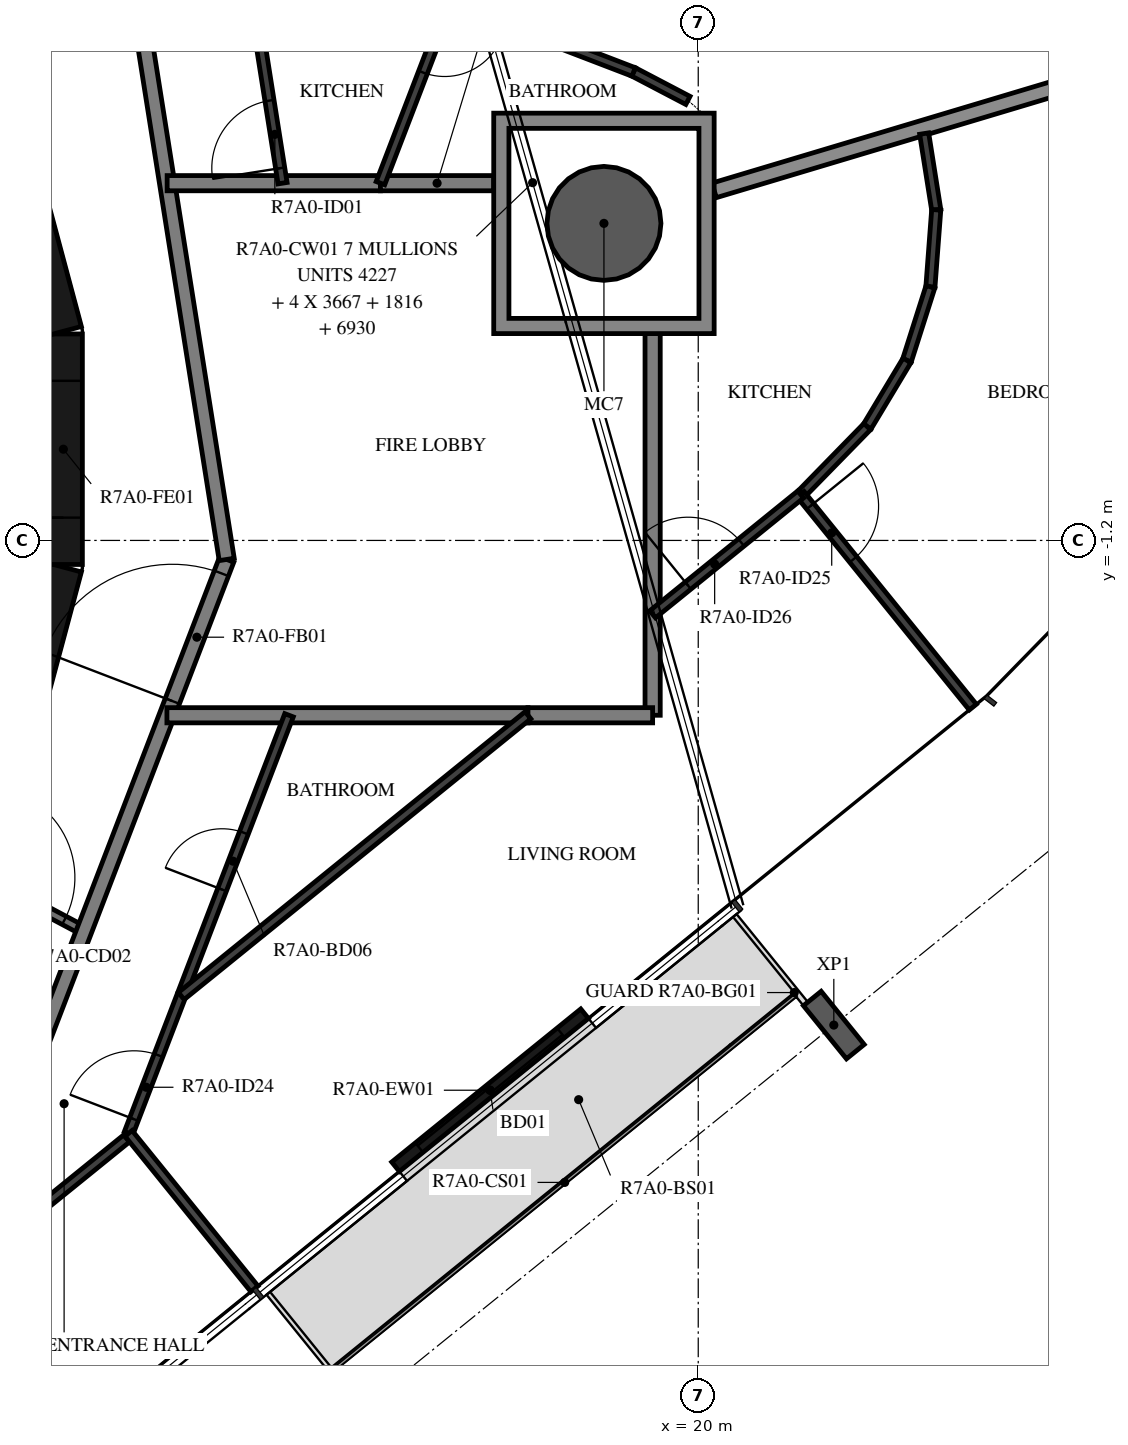
"""IFC4 building model, lengths in metres.
Left out: names, types, materials, properties, quantities, classifications, styles, units other than length and angle.
Written with IfcOpenShell. Run it as: python <this file> out.ifc"""

import sys

from ifc_helpers import new_model, si_unit, direction, frame, frame_2d, origin, origin_2d, place, context, subcontext, project, spatial, polyline, rectangle, hollow_circle, i_section, outline, extrude, element, fill, save


model = new_model("IFC4")
c1 = context("Model", 3, precision=1e-05, world=origin(), true_north=direction((0.0, 1.0)))
c2 = subcontext(c1, "Body", "Model", "MODEL_VIEW")
j1 = project(units=[si_unit("LENGTHUNIT", "METRE"), si_unit("PLANEANGLEUNIT", "RADIAN")], contexts=[c1])
p1 = place(None, origin())
s1 = spatial("IfcSite", under=j1, at=p1, CompositionType="ELEMENT")
p2 = place(p1, origin())
s2 = spatial("IfcBuilding", under=s1, at=p2, CompositionType="ELEMENT")
p3 = place(p2, frame((0.0, 0.0, 270.4)))
s3 = spatial("IfcBuildingStorey", under=s2, at=p3, CompositionType="ELEMENT", Elevation=270.4)
p4 = place(p3, frame((18.76, 2.971, -0.38), z_axis=(0.0, 0.0, 1.0), x_axis=(1.0, 0.0, 0.0)))
e1 = element("IfcColumn", 1, at=p4, inside=s3, PredefinedType="COLUMN", context=c2, shape_type="SweptSolid", body=[
    extrude(hollow_circle(Radius=0.75, WallThickness=0.035, at=origin_2d()), origin(), (0.0, 0.0, 1.0), 3.5),
])
p5 = place(p3, frame((21.784, -7.576, -0.38), z_axis=(0.0, 0.0, 1.0), x_axis=(-0.777146167973, -0.629320136024, 0.0)))
e2 = element("IfcColumn", 2, at=p5, inside=s3, PredefinedType="COLUMN", context=c2, shape_type="SweptSolid", body=[
    extrude(i_section(OverallWidth=0.3, OverallDepth=0.9, WebThickness=0.019, FlangeThickness=0.035, FilletRadius=0.03, at=origin_2d()), origin(), (0.0, 0.0, 1.0), 3.5),
])
p6 = place(p3, frame((16.018, -9.44, 0.0), z_axis=(0.0, 0.0, 1.0), x_axis=(0.777125818, 0.629345265333, 0.0)))
e3 = element("IfcWall", 3, at=p6, inside=s3, PredefinedType="STANDARD", context=c2, shape_type="SweptSolid", body=[
    extrude(rectangle(XDim=3.2, YDim=0.16, at=frame_2d((1.6, 0.0))), origin(), (0.0, 0.0, 1.0), 3.12),
])
p7 = place(p6, frame((0.4, 0.0, 0.0)))
e4 = element("IfcOpeningElement", 4, at=p7, cuts=e3, PredefinedType="OPENING", context=c2, shape_type="SweptSolid", body=[
    extrude(rectangle(XDim=2.4, YDim=2.4, at=frame_2d((1.2, 1.2))), frame((0.0, 0.09, 0.0), z_axis=(0.0, -1.0, 0.0), x_axis=(1.0, 0.0, 0.0)), (0.0, 0.0, 1.0), 0.18),
])
p8 = place(p3, frame((10.858, -4.479, 0.0), z_axis=(0.0, 0.0, 1.0), x_axis=(0.258734743916, 0.965948410781, 0.0)))
e5 = element("IfcWall", 5, at=p8, inside=s3, PredefinedType="SHEAR", context=c2, shape_type="SweptSolid", body=[
    extrude(rectangle(XDim=3.033, YDim=0.5, at=frame_2d((1.516, 0.0))), origin(), (0.0, 0.0, 1.0), 3.12),
])
p9 = place(p3, frame((11.647, -1.516, 0.0), z_axis=(0.0, 0.0, 1.0), x_axis=(0.0, 1.0, 0.0)))
e6 = element("IfcWall", 6, at=p9, inside=s3, PredefinedType="SHEAR", context=c2, shape_type="SweptSolid", body=[
    extrude(rectangle(XDim=3.033, YDim=0.5, at=frame_2d((1.516, 0.0))), origin(), (0.0, 0.0, 1.0), 3.12),
])
p10 = place(p9, frame((0.616, 0.0, 0.0)))
e7 = element("IfcOpeningElement", 7, at=p10, cuts=e6, PredefinedType="OPENING", context=c2, shape_type="SweptSolid", body=[
    extrude(rectangle(XDim=1.8, YDim=2.1, at=frame_2d((0.9, 1.05))), frame((0.0, 0.26, 0.0), z_axis=(0.0, -1.0, 0.0), x_axis=(1.0, 0.0, 0.0)), (0.0, 0.0, 1.0), 0.52),
])
p11 = place(p3, frame((11.643, 1.55, 0.0), z_axis=(0.0, 0.0, 1.0), x_axis=(-0.258734743916, 0.965948410781, 0.0)))
e8 = element("IfcWall", 8, at=p11, inside=s3, PredefinedType="SHEAR", context=c2, shape_type="SweptSolid", body=[
    extrude(rectangle(XDim=3.033, YDim=0.5, at=frame_2d((1.516, 0.0))), origin(), (0.0, 0.0, 1.0), 3.12),
])
p12 = place(p3, frame((10.511, -5.589, 0.0), z_axis=(0.0, 0.0, 1.0), x_axis=(0.882983002821, -0.469404960273, 0.0)))
e9 = element("IfcWall", 9, at=p12, inside=s3, PredefinedType="PARTITIONING", context=c2, shape_type="SweptSolid", body=[
    extrude(rectangle(XDim=1.596, YDim=0.12, at=frame_2d((0.798, 0.0))), origin(), (0.0, 0.0, 1.0), 3.12),
])
p13 = place(p12, frame((0.1, 0.0, 0.0)))
e10 = element("IfcOpeningElement", 10, at=p13, cuts=e9, PredefinedType="OPENING", context=c2, shape_type="SweptSolid", body=[
    extrude(rectangle(XDim=1.2, YDim=2.1, at=frame_2d((0.6, 1.05))), frame((0.0, 0.07, 0.0), z_axis=(0.0, -1.0, 0.0), x_axis=(1.0, 0.0, 0.0)), (0.0, 0.0, 1.0), 0.14),
])
p14 = place(p3, frame((11.223, -8.154, 0.0), z_axis=(0.0, 0.0, 1.0), x_axis=(0.358341090983, 0.93359073609, 0.0)))
e11 = element("IfcWall", 11, at=p14, inside=s3, PredefinedType="STANDARD", context=c2, shape_type="SweptSolid", body=[
    extrude(rectangle(XDim=7.181, YDim=0.2, at=frame_2d((3.59, 0.0))), origin(), (0.0, 0.0, 1.0), 3.12),
])
p15 = place(p14, frame((5.185, 0.0, 0.0)))
e12 = element("IfcOpeningElement", 12, at=p15, cuts=e11, PredefinedType="OPENING", context=c2, shape_type="SweptSolid", body=[
    extrude(rectangle(XDim=1.8, YDim=2.1, at=frame_2d((0.9, 1.05))), frame((0.0, 0.11, 0.0), z_axis=(0.0, -1.0, 0.0), x_axis=(1.0, 0.0, 0.0)), (0.0, 0.0, 1.0), 0.22),
])
p16 = place(p3, frame((13.797, -1.45, 0.0), z_axis=(0.0, 0.0, 1.0), x_axis=(-0.156421704315, 0.987690361611, 0.0)))
e13 = element("IfcWall", 13, at=p16, inside=s3, PredefinedType="STANDARD", context=c2, shape_type="SweptSolid", body=[
    extrude(rectangle(XDim=7.181, YDim=0.2, at=frame_2d((3.591, 0.0))), origin(), (0.0, 0.0, 1.0), 3.12),
])
p17 = place(p3, frame((15.819, 3.5, 0.0), z_axis=(0.0, 0.0, 1.0), x_axis=(-1.0, 0.0, 0.0)))
e14 = element("IfcWall", 14, at=p17, inside=s3, PredefinedType="STANDARD", context=c2, shape_type="SweptSolid", body=[
    extrude(rectangle(XDim=2.806, YDim=0.2, at=frame_2d((1.403, 0.0))), origin(), (0.0, 0.0, 1.0), 3.12),
])
p18 = place(p3, frame((17.309, 3.5, 0.0), z_axis=(0.0, 0.0, 1.0), x_axis=(-1.0, 0.0, 0.0)))
e15 = element("IfcWall", 15, at=p18, inside=s3, PredefinedType="STANDARD", context=c2, shape_type="SweptSolid", body=[
    extrude(rectangle(XDim=1.49, YDim=0.2, at=frame_2d((0.745, 0.0))), origin(), (0.0, 0.0, 1.0), 3.12),
])
p19 = place(p3, frame((13.01, -3.5, 0.0), z_axis=(0.0, 0.0, 1.0), x_axis=(1.0, 0.0, 0.0)))
e16 = element("IfcWall", 16, at=p19, inside=s3, PredefinedType="STANDARD", context=c2, shape_type="SweptSolid", body=[
    extrude(rectangle(XDim=4.75, YDim=0.2, at=frame_2d((2.375, 0.0))), origin(), (0.0, 0.0, 1.0), 3.12),
])
p20 = place(p3, frame((19.4, -3.5, 0.0), z_axis=(0.0, 0.0, 1.0), x_axis=(0.0, 1.0, 0.0)))
e17 = element("IfcWall", 17, at=p20, inside=s3, PredefinedType="STANDARD", context=c2, shape_type="SweptSolid", body=[
    extrude(rectangle(XDim=5.021, YDim=0.2, at=frame_2d((2.511, 0.0))), origin(), (0.0, 0.0, 1.0), 3.12),
])
p21 = place(p3, frame((17.76, -3.5, 0.0), z_axis=(0.0, 0.0, 1.0), x_axis=(1.0, 0.0, 0.0)))
e18 = element("IfcWall", 18, at=p21, inside=s3, PredefinedType="STANDARD", context=c2, shape_type="SweptSolid", body=[
    extrude(rectangle(XDim=1.64, YDim=0.2, at=frame_2d((0.82, 0.0))), origin(), (0.0, 0.0, 1.0), 3.12),
])
p22 = place(p3, frame((20.209, 3.405, 0.0), z_axis=(0.0, 0.0, 1.0), x_axis=(0.957991224208, 0.286797514529, 0.0)))
e19 = element("IfcWall", 19, at=p22, inside=s3, PredefinedType="STANDARD", context=c2, shape_type="SweptSolid", body=[
    extrude(rectangle(XDim=6.471, YDim=0.2, at=frame_2d((3.236, 0.0))), origin(), (0.0, 0.0, 1.0), 2.73),
])
p23 = place(p3, frame((14.531, 3.5, 0.0), z_axis=(0.0, 0.0, 1.0), x_axis=(-0.1564580042, 0.987684612071, 0.0)))
e20 = element("IfcWall", 20, at=p23, inside=s3, PredefinedType="PARTITIONING", context=c2, shape_type="SweptSolid", body=[
    extrude(rectangle(XDim=2.809, YDim=0.12, at=frame_2d((1.404, 0.0))), origin(), (0.0, 0.0, 1.0), 3.12),
])
p24 = place(p23, frame((0.2, 0.0, 0.0)))
e21 = element("IfcOpeningElement", 21, at=p24, cuts=e20, PredefinedType="OPENING", context=c2, shape_type="SweptSolid", body=[
    extrude(rectangle(XDim=0.9, YDim=2.1, at=frame_2d((0.45, 1.05))), frame((0.0, 0.07, 0.0), z_axis=(0.0, -1.0, 0.0), x_axis=(1.0, 0.0, 0.0)), (0.0, 0.0, 1.0), 0.14),
])
p25 = place(p3, frame((19.865, 4.589, 0.0), z_axis=(0.0, 0.0, 1.0), x_axis=(-0.885855229108, 0.46396175819, 0.0)))
e22 = element("IfcWall", 22, at=p25, inside=s3, PredefinedType="PARTITIONING", context=c2, shape_type="SweptSolid", body=[
    extrude(rectangle(XDim=0.807, YDim=0.12, at=frame_2d((0.403, 0.0))), origin(), (0.0, 0.0, 1.0), 3.12),
])
p26 = place(p3, frame((19.15, 4.963, 0.0), z_axis=(0.0, 0.0, 1.0), x_axis=(-0.933571304602, 0.358391711992, 0.0)))
e23 = element("IfcWall", 23, at=p26, inside=s3, PredefinedType="PARTITIONING", context=c2, shape_type="SweptSolid", body=[
    extrude(rectangle(XDim=6.212, YDim=0.12, at=frame_2d((3.106, 0.0))), origin(), (0.0, 0.0, 1.0), 3.12),
])
p27 = place(p3, frame((16.737, 5.89, 0.0), z_axis=(0.0, 0.0, 1.0), x_axis=(-0.358397454141, -0.933569100209, 0.0)))
e24 = element("IfcWall", 24, at=p27, inside=s3, PredefinedType="PARTITIONING", context=c2, shape_type="SweptSolid", body=[
    extrude(rectangle(XDim=2.56, YDim=0.12, at=frame_2d((1.28, 0.0))), origin(), (0.0, 0.0, 1.0), 3.12),
])
p28 = place(p27, frame((0.2, 0.0, 0.0)))
e25 = element("IfcOpeningElement", 25, at=p28, cuts=e24, PredefinedType="OPENING", context=c2, shape_type="SweptSolid", body=[
    extrude(rectangle(XDim=0.8, YDim=2.1, at=frame_2d((0.4, 1.05))), frame((0.0, 0.07, 0.0), z_axis=(0.0, -1.0, 0.0), x_axis=(1.0, 0.0, 0.0)), (0.0, 0.0, 1.0), 0.14),
])
p29 = place(p3, frame((6.274, -14.092, 0.0), z_axis=(0.0, 0.0, 1.0), x_axis=(0.777135206268, 0.62933367237, 0.0)))
e26 = element("IfcWall", 26, at=p29, inside=s3, PredefinedType="PARTITIONING", context=c2, shape_type="SweptSolid", body=[
    extrude(rectangle(XDim=7.985, YDim=0.12, at=frame_2d((3.992, 0.0))), origin(), (0.0, 0.0, 1.0), 3.12),
])
p30 = place(p29, frame((0.2, 0.0, 0.0)))
e27 = element("IfcOpeningElement", 27, at=p30, cuts=e26, PredefinedType="OPENING", context=c2, shape_type="SweptSolid", body=[
    extrude(rectangle(XDim=0.9, YDim=2.1, at=frame_2d((0.45, 1.05))), frame((0.0, 0.07, 0.0), z_axis=(0.0, -1.0, 0.0), x_axis=(1.0, 0.0, 0.0)), (0.0, 0.0, 1.0), 0.14),
])
p31 = place(p3, frame((12.505, -9.001, 0.0), z_axis=(0.0, 0.0, 1.0), x_axis=(0.358373707046, 0.933578216379, 0.0)))
e28 = element("IfcWall", 28, at=p31, inside=s3, PredefinedType="PARTITIONING", context=c2, shape_type="SweptSolid", body=[
    extrude(rectangle(XDim=5.892, YDim=0.12, at=frame_2d((2.946, 0.0))), origin(), (0.0, 0.0, 1.0), 3.12),
])
p32 = place(p31, frame((0.2, 0.0, 0.0)))
e29 = element("IfcOpeningElement", 29, at=p32, cuts=e28, PredefinedType="OPENING", context=c2, shape_type="SweptSolid", body=[
    extrude(rectangle(XDim=0.9, YDim=2.1, at=frame_2d((0.45, 1.05))), frame((0.0, 0.07, 0.0), z_axis=(0.0, -1.0, 0.0), x_axis=(1.0, 0.0, 0.0)), (0.0, 0.0, 1.0), 0.14),
])
p33 = place(p31, frame((3.436, 0.0, 0.0)))
e30 = element("IfcOpeningElement", 30, at=p33, cuts=e28, PredefinedType="OPENING", context=c2, shape_type="SweptSolid", body=[
    extrude(rectangle(XDim=0.8, YDim=2.1, at=frame_2d((0.4, 1.05))), frame((0.0, 0.07, 0.0), z_axis=(0.0, -1.0, 0.0), x_axis=(1.0, 0.0, 0.0)), (0.0, 0.0, 1.0), 0.14),
])
p34 = place(p3, frame((22.972, 4.153, 0.0), z_axis=(0.0, 0.0, 1.0), x_axis=(0.156209385929, -0.987723963336, 0.0)))
e31 = element("IfcWall", 31, at=p34, inside=s3, PredefinedType="PARTITIONING", context=c2, shape_type="SweptSolid", body=[
    extrude(rectangle(XDim=1.016, YDim=0.12, at=frame_2d((0.508, 0.0))), origin(), (0.0, 0.0, 1.0), 3.12),
])
p35 = place(p3, frame((23.131, 3.149, 0.0), z_axis=(0.0, 0.0, 1.0), x_axis=(-0.075446997935, -0.99714981347, 0.0)))
e32 = element("IfcWall", 32, at=p35, inside=s3, PredefinedType="PARTITIONING", context=c2, shape_type="SweptSolid", body=[
    extrude(rectangle(XDim=1.016, YDim=0.12, at=frame_2d((0.508, 0.0))), origin(), (0.0, 0.0, 1.0), 3.12),
])
p36 = place(p3, frame((23.054, 2.136, 0.0), z_axis=(0.0, 0.0, 1.0), x_axis=(-0.303511129679, -0.952827893253, 0.0)))
e33 = element("IfcWall", 33, at=p36, inside=s3, PredefinedType="PARTITIONING", context=c2, shape_type="SweptSolid", body=[
    extrude(rectangle(XDim=1.016, YDim=0.12, at=frame_2d((0.508, 0.0))), origin(), (0.0, 0.0, 1.0), 3.12),
])
p37 = place(p3, frame((22.746, 1.168, 0.0), z_axis=(0.0, 0.0, 1.0), x_axis=(-0.515096534995, -0.857132171626, 0.0)))
e34 = element("IfcWall", 34, at=p37, inside=s3, PredefinedType="PARTITIONING", context=c2, shape_type="SweptSolid", body=[
    extrude(rectangle(XDim=1.016, YDim=0.12, at=frame_2d((0.508, 0.0))), origin(), (0.0, 0.0, 1.0), 3.12),
])
p38 = place(p3, frame((22.223, 0.298, 0.0), z_axis=(0.0, 0.0, 1.0), x_axis=(-0.69880109182, -0.715316037896, 0.0)))
e35 = element("IfcWall", 35, at=p38, inside=s3, PredefinedType="PARTITIONING", context=c2, shape_type="SweptSolid", body=[
    extrude(rectangle(XDim=1.227, YDim=0.12, at=frame_2d((0.614, 0.0))), origin(), (0.0, 0.0, 1.0), 3.12),
])
p39 = place(p3, frame((21.347, -0.595, 0.0), z_axis=(0.0, 0.0, 1.0), x_axis=(0.62934843781, -0.7771232488, 0.0)))
e36 = element("IfcWall", 36, at=p39, inside=s3, PredefinedType="PARTITIONING", context=c2, shape_type="SweptSolid", body=[
    extrude(rectangle(XDim=3.6, YDim=0.12, at=frame_2d((1.8, 0.0))), origin(), (0.0, 0.0, 1.0), 3.12),
])
p40 = place(p39, frame((0.2, 0.0, 0.0)))
e37 = element("IfcOpeningElement", 37, at=p40, cuts=e36, PredefinedType="OPENING", context=c2, shape_type="SweptSolid", body=[
    extrude(rectangle(XDim=0.9, YDim=2.1, at=frame_2d((0.45, 1.05))), frame((0.0, 0.07, 0.0), z_axis=(0.0, -1.0, 0.0), x_axis=(1.0, 0.0, 0.0)), (0.0, 0.0, 1.0), 0.14),
])
p41 = place(p3, frame((19.4, -2.172, 0.0), z_axis=(0.0, 0.0, 1.0), x_axis=(0.777147279935, 0.629318762862, 0.0)))
e38 = element("IfcWall", 38, at=p41, inside=s3, PredefinedType="PARTITIONING", context=c2, shape_type="SweptSolid", body=[
    extrude(rectangle(XDim=2.505, YDim=0.12, at=frame_2d((1.253, 0.0))), origin(), (0.0, 0.0, 1.0), 3.12),
])
p42 = place(p41, frame((0.6, 0.0, 0.0)))
e39 = element("IfcOpeningElement", 39, at=p42, cuts=e38, PredefinedType="OPENING", context=c2, shape_type="SweptSolid", body=[
    extrude(rectangle(XDim=0.9, YDim=2.1, at=frame_2d((0.45, 1.05))), frame((0.0, 0.07, 0.0), z_axis=(0.0, -1.0, 0.0), x_axis=(1.0, 0.0, 0.0)), (0.0, 0.0, 1.0), 0.14),
])
p43 = place(p3, frame((14.161, -11.046, 0.0), z_axis=(0.0, 0.0, 1.0), x_axis=(-0.62931028473, 0.777154145284, 0.0)))
e40 = element("IfcWall", 40, at=p43, inside=s3, PredefinedType="PARTITIONING", context=c2, shape_type="SweptSolid", body=[
    extrude(rectangle(XDim=2.632, YDim=0.12, at=frame_2d((1.316, 0.0))), origin(), (0.0, 0.0, 1.0), 2.73),
])
p44 = place(p3, frame((17.76, -3.5, 0.0), z_axis=(0.0, 0.0, 1.0), x_axis=(-0.777133455716, -0.62933583404, 0.0)))
e41 = element("IfcWall", 41, at=p44, inside=s3, PredefinedType="PARTITIONING", context=c2, shape_type="SweptSolid", body=[
    extrude(rectangle(XDim=5.869, YDim=0.12, at=frame_2d((2.935, 0.0))), origin(), (0.0, 0.0, 1.0), 3.12),
])
p45 = place(p3, origin())
e42 = element("IfcWall", 42, at=p45, inside=s3, PredefinedType="STANDARD", context=c2, shape_type="SweptSolid", body=[
    extrude(outline(polyline([(20.209, 4.421), (20.209, 1.521), (17.309, 1.521), (17.309, 4.421), (20.209, 4.421)]), holes=[polyline([(17.51, 1.721), (20.01, 1.721), (20.01, 4.221), (17.51, 4.221), (17.51, 1.721)])]), origin(), (0.0, 0.0, 1.0), 3.12),
])
p46 = place(p7, origin())
e43 = element("IfcDoor", 43, at=p46, inside=s3, OperationType="DOUBLE_DOOR_SLIDING", PredefinedType="DOOR", context=c2, shape_type="SweptSolid", body=[
    extrude(rectangle(XDim=2.4, YDim=2.4, at=frame_2d((1.2, 1.2))), frame((0.0, 0.025, 0.0), z_axis=(0.0, -1.0, 0.0), x_axis=(1.0, 0.0, 0.0)), (0.0, 0.0, 1.0), 0.05),
])
fill(e4, e43)
p47 = place(p10, origin())
e44 = element("IfcDoor", 44, at=p47, inside=s3, OperationType="DOUBLE_DOOR_SINGLE_SWING", PredefinedType="DOOR", context=c2, shape_type="SweptSolid", body=[
    extrude(rectangle(XDim=1.8, YDim=2.1, at=frame_2d((0.9, 1.05))), frame((0.0, 0.025, 0.0), z_axis=(0.0, -1.0, 0.0), x_axis=(1.0, 0.0, 0.0)), (0.0, 0.0, 1.0), 0.05),
])
fill(e7, e44)
p48 = place(p24, origin())
e45 = element("IfcDoor", 45, at=p48, inside=s3, OperationType="SINGLE_SWING_LEFT", PredefinedType="DOOR", context=c2, shape_type="SweptSolid", body=[
    extrude(rectangle(XDim=0.9, YDim=2.1, at=frame_2d((0.45, 1.05))), frame((0.0, 0.025, 0.0), z_axis=(0.0, -1.0, 0.0), x_axis=(1.0, 0.0, 0.0)), (0.0, 0.0, 1.0), 0.05),
])
fill(e21, e45)
p49 = place(p28, origin())
e46 = element("IfcDoor", 46, at=p49, inside=s3, OperationType="SINGLE_SWING_LEFT", PredefinedType="DOOR", context=c2, shape_type="SweptSolid", body=[
    extrude(rectangle(XDim=0.8, YDim=2.1, at=frame_2d((0.4, 1.05))), frame((0.0, 0.025, 0.0), z_axis=(0.0, -1.0, 0.0), x_axis=(1.0, 0.0, 0.0)), (0.0, 0.0, 1.0), 0.05),
])
fill(e25, e46)
p50 = place(p32, origin())
e47 = element("IfcDoor", 47, at=p50, inside=s3, OperationType="SINGLE_SWING_RIGHT", PredefinedType="DOOR", context=c2, shape_type="SweptSolid", body=[
    extrude(rectangle(XDim=0.9, YDim=2.1, at=frame_2d((0.45, 1.05))), frame((0.0, 0.025, 0.0), z_axis=(0.0, -1.0, 0.0), x_axis=(1.0, 0.0, 0.0)), (0.0, 0.0, 1.0), 0.05),
])
fill(e29, e47)
p51 = place(p33, origin())
e48 = element("IfcDoor", 48, at=p51, inside=s3, OperationType="SINGLE_SWING_RIGHT", PredefinedType="DOOR", context=c2, shape_type="SweptSolid", body=[
    extrude(rectangle(XDim=0.8, YDim=2.1, at=frame_2d((0.4, 1.05))), frame((0.0, 0.025, 0.0), z_axis=(0.0, -1.0, 0.0), x_axis=(1.0, 0.0, 0.0)), (0.0, 0.0, 1.0), 0.05),
])
fill(e30, e48)
p52 = place(p40, origin())
e49 = element("IfcDoor", 49, at=p52, inside=s3, OperationType="SINGLE_SWING_RIGHT", PredefinedType="DOOR", context=c2, shape_type="SweptSolid", body=[
    extrude(rectangle(XDim=0.9, YDim=2.1, at=frame_2d((0.45, 1.05))), frame((0.0, 0.025, 0.0), z_axis=(0.0, -1.0, 0.0), x_axis=(1.0, 0.0, 0.0)), (0.0, 0.0, 1.0), 0.05),
])
fill(e37, e49)
p53 = place(p42, origin())
e50 = element("IfcDoor", 50, at=p53, inside=s3, OperationType="SINGLE_SWING_LEFT", PredefinedType="DOOR", context=c2, shape_type="SweptSolid", body=[
    extrude(rectangle(XDim=0.9, YDim=2.1, at=frame_2d((0.45, 1.05))), frame((0.0, 0.025, 0.0), z_axis=(0.0, -1.0, 0.0), x_axis=(1.0, 0.0, 0.0)), (0.0, 0.0, 1.0), 0.05),
])
fill(e39, e50)
p54 = place(p13, origin())
e51 = element("IfcDoor", 51, at=p54, inside=s3, OperationType="DOUBLE_DOOR_SINGLE_SWING", PredefinedType="DOOR", context=c2, shape_type="SweptSolid", body=[
    extrude(rectangle(XDim=1.2, YDim=2.1, at=frame_2d((0.6, 1.05))), frame((0.0, 0.025, 0.0), z_axis=(0.0, -1.0, 0.0), x_axis=(1.0, 0.0, 0.0)), (0.0, 0.0, 1.0), 0.05),
])
fill(e10, e51)
p55 = place(p15, origin())
e52 = element("IfcDoor", 52, at=p55, inside=s3, OperationType="DOUBLE_DOOR_SINGLE_SWING", PredefinedType="DOOR", context=c2, shape_type="SweptSolid", body=[
    extrude(rectangle(XDim=1.8, YDim=2.1, at=frame_2d((0.9, 1.05))), frame((0.0, 0.025, 0.0), z_axis=(0.0, -1.0, 0.0), x_axis=(1.0, 0.0, 0.0)), (0.0, 0.0, 1.0), 0.05),
])
fill(e12, e52)
save(model, sys.argv[1])
